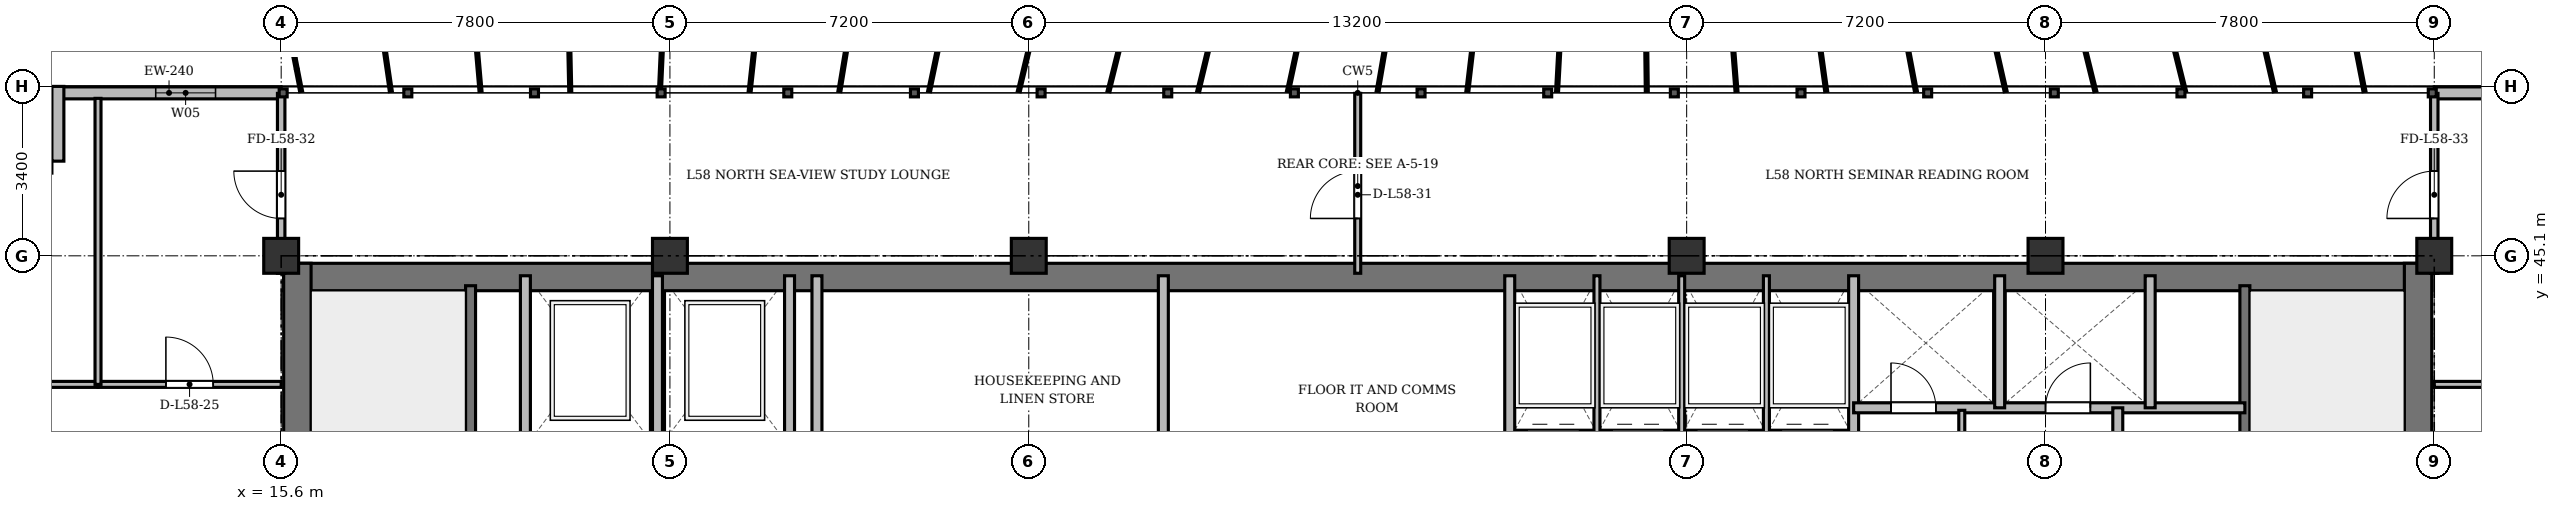
"""IFC4 building model, lengths in metres.
Left out: names, types, materials, properties, quantities, classifications, styles, units other than length and angle.
Written with IfcOpenShell. Run it as: python <this file> out.ifc"""

import sys

from ifc_helpers import new_model, si_unit, direction, frame, frame_2d, origin, origin_2d, place, context, subcontext, project, spatial, rectangle, extrude, source, transform, mapped, element, fill, save


model = new_model("IFC4")
c1 = context("Model", 3, precision=1e-05, world=origin(), true_north=direction((0.0, 1.0)))
c2 = subcontext(c1, "Body", "Model", "MODEL_VIEW")
j1 = project(units=[si_unit("LENGTHUNIT", "METRE"), si_unit("PLANEANGLEUNIT", "RADIAN")], contexts=[c1])
p1 = place(None, origin())
s1 = spatial("IfcSite", under=j1, at=p1, CompositionType="ELEMENT")
p2 = place(p1, origin())
s2 = spatial("IfcBuilding", under=s1, at=p2, CompositionType="ELEMENT")
p3 = place(p2, frame((0.0, 0.0, 222.9)))
s3 = spatial("IfcBuildingStorey", under=s2, at=p3, CompositionType="ELEMENT", Elevation=222.9)
m1 = source(origin(), c2, "Body", "SweptSolid", [
    extrude(rectangle(XDim=0.7, YDim=0.7, at=origin_2d()), origin(), (0.0, 0.0, 1.0), 3.6),
])
for number, where, z_axis, x_axis in (
    (1, (15.6, 45.1, 0.0), (0.0, 0.0, 1.0), (1.0, 0.0, 0.0)),
    (2, (23.4, 45.1, 0.0), (0.0, 0.0, 1.0), (1.0, 0.0, 0.0)),
    (3, (30.6, 45.1, 0.0), (0.0, 0.0, 1.0), (1.0, 0.0, 0.0)),
    (4, (43.8, 45.1, 0.0), (0.0, 0.0, 1.0), (1.0, 0.0, 0.0)),
    (5, (51.0, 45.1, 0.0), (0.0, 0.0, 1.0), (1.0, 0.0, 0.0)),
    (6, (58.8, 45.1, 0.0), (0.0, 0.0, 1.0), (1.0, 0.0, 0.0)),
):
    element("IfcColumn", number, at=place(p3, frame(where, z_axis=z_axis, x_axis=x_axis)), inside=s3, PredefinedType="COLUMN", context=c2, shape_type="MappedRepresentation", body=[
        mapped(m1, transform((0.0, 0.0, 0.0), x_axis=(1.0, 0.0, 0.0), y_axis=(0.0, 1.0, 0.0), z_axis=(0.0, 0.0, 1.0), scale=1.0)),
    ])
p4 = place(p3, frame((11.1, 48.37, 0.0), z_axis=(0.0, 0.0, 1.0), x_axis=(1.0, 0.0, 0.0)))
e7 = element("IfcWall", 7, at=p4, inside=s3, PredefinedType="SOLIDWALL", context=c2, shape_type="SweptSolid", body=[
    extrude(rectangle(XDim=4.5, YDim=0.24, at=frame_2d((2.25, 0.0))), origin(), (0.0, 0.0, 1.0), 3.36),
])
p5 = place(p4, frame((1.983, 0.0, 0.9)))
e8 = element("IfcOpeningElement", 8, at=p5, cuts=e7, PredefinedType="OPENING", context=c2, shape_type="SweptSolid", body=[
    extrude(rectangle(XDim=1.2, YDim=1.65, at=frame_2d((0.6, 0.825))), frame((0.0, 0.13, 0.0), z_axis=(0.0, -1.0, 0.0), x_axis=(1.0, 0.0, 0.0)), (0.0, 0.0, 1.0), 0.26),
])
p6 = place(p3, frame((58.8, 48.37, 0.0), z_axis=(0.0, 0.0, 1.0), x_axis=(1.0, 0.0, 0.0)))
e9 = element("IfcWall", 9, at=p6, inside=s3, PredefinedType="SOLIDWALL", context=c2, shape_type="SweptSolid", body=[
    extrude(rectangle(XDim=4.5, YDim=0.24, at=frame_2d((2.25, 0.0))), origin(), (0.0, 0.0, 1.0), 3.36),
])
p7 = place(p6, frame((1.318, 0.0, 0.9)))
e10 = element("IfcOpeningElement", 10, at=p7, cuts=e9, PredefinedType="OPENING", context=c2, shape_type="SweptSolid", body=[
    extrude(rectangle(XDim=1.2, YDim=1.65, at=frame_2d((0.6, 0.825))), frame((0.0, 0.13, 0.0), z_axis=(0.0, -1.0, 0.0), x_axis=(1.0, 0.0, 0.0)), (0.0, 0.0, 1.0), 0.26),
])
p8 = place(p3, frame((11.12, 47.0, 0.0), z_axis=(0.0, 0.0, 1.0), x_axis=(0.0, 1.0, 0.0)))
e11 = element("IfcWall", 11, at=p8, inside=s3, PredefinedType="SOLIDWALL", context=c2, shape_type="SweptSolid", body=[
    extrude(rectangle(XDim=1.5, YDim=0.24, at=frame_2d((0.75, 0.0))), origin(), (0.0, 0.0, 1.0), 3.36),
])
p9 = place(p3, frame((15.65, 44.675, 0.0), z_axis=(0.0, 0.0, 1.0), x_axis=(1.0, 0.0, 0.0)))
e12 = element("IfcWall", 12, at=p9, inside=s3, PredefinedType="SHEAR", context=c2, shape_type="SweptSolid", body=[
    extrude(rectangle(XDim=43.1, YDim=0.55, at=frame_2d((21.55, 0.0))), origin(), (0.0, 0.0, 1.0), 3.36),
])
for number, where, z_axis, x_axis in (
    (13, (15.925, 33.4, 0.0), (0.0, 0.0, 1.0), (0.0, 1.0, 0.0)),
    (14, (58.475, 33.4, 0.0), (0.0, 0.0, 1.0), (0.0, 1.0, 0.0)),
):
    element("IfcWall", number, at=place(p3, frame(where, z_axis=z_axis, x_axis=x_axis)), inside=s3, PredefinedType="SHEAR", context=c2, shape_type="SweptSolid", body=[
        extrude(rectangle(XDim=11.55, YDim=0.55, at=frame_2d((5.775, 0.0))), origin(), (0.0, 0.0, 1.0), 3.36),
    ])
p10 = place(p3, frame((19.4, 33.4, 0.0), z_axis=(0.0, 0.0, 1.0), x_axis=(0.0, 1.0, 0.0)))
e15 = element("IfcWall", 15, at=p10, inside=s3, PredefinedType="SHEAR", context=c2, shape_type="SweptSolid", body=[
    extrude(rectangle(XDim=11.1, YDim=0.2, at=frame_2d((5.55, 0.0))), origin(), (0.0, 0.0, 1.0), 3.36),
])
p11 = place(p10, frame((0.85, 0.0, 0.0)))
e16 = element("IfcOpeningElement", 16, at=p11, cuts=e15, PredefinedType="OPENING", context=c2, shape_type="SweptSolid", body=[
    extrude(rectangle(XDim=1.1, YDim=2.15, at=frame_2d((0.55, 1.075))), frame((0.0, 0.11, 0.0), z_axis=(0.0, -1.0, 0.0), x_axis=(1.0, 0.0, 0.0)), (0.0, 0.0, 1.0), 0.22),
])
p12 = place(p3, frame((55.0, 33.4, 0.0), z_axis=(0.0, 0.0, 1.0), x_axis=(0.0, 1.0, 0.0)))
e17 = element("IfcWall", 17, at=p12, inside=s3, PredefinedType="SHEAR", context=c2, shape_type="SweptSolid", body=[
    extrude(rectangle(XDim=11.1, YDim=0.2, at=frame_2d((5.55, 0.0))), origin(), (0.0, 0.0, 1.0), 3.36),
])
p13 = place(p12, frame((0.85, 0.0, 0.0)))
e18 = element("IfcOpeningElement", 18, at=p13, cuts=e17, PredefinedType="OPENING", context=c2, shape_type="SweptSolid", body=[
    extrude(rectangle(XDim=1.1, YDim=2.15, at=frame_2d((0.55, 1.075))), frame((0.0, 0.11, 0.0), z_axis=(0.0, -1.0, 0.0), x_axis=(1.0, 0.0, 0.0)), (0.0, 0.0, 1.0), 0.22),
])
for number, where, z_axis, x_axis in (
    (19, (20.5, 41.3, 0.0), (0.0, 0.0, 1.0), (0.0, 1.0, 0.0)),
    (20, (23.15, 41.3, 0.0), (0.0, 0.0, 1.0), (0.0, 1.0, 0.0)),
    (21, (25.8, 41.3, 0.0), (0.0, 0.0, 1.0), (0.0, 1.0, 0.0)),
):
    element("IfcWall", number, at=place(p3, frame(where, z_axis=z_axis, x_axis=x_axis)), inside=s3, PredefinedType="SOLIDWALL", context=c2, shape_type="SweptSolid", body=[
        extrude(rectangle(XDim=3.4, YDim=0.2, at=frame_2d((1.7, 0.0))), origin(), (0.0, 0.0, 1.0), 3.36),
    ])
for number, where, z_axis, x_axis in (
    (22, (26.35, 33.4, 0.0), (0.0, 0.0, 1.0), (0.0, 1.0, 0.0)),
    (23, (33.3, 33.4, 0.0), (0.0, 0.0, 1.0), (0.0, 1.0, 0.0)),
):
    element("IfcWall", number, at=place(p3, frame(where, z_axis=z_axis, x_axis=x_axis)), inside=s3, PredefinedType="SOLIDWALL", context=c2, shape_type="SweptSolid", body=[
        extrude(rectangle(XDim=11.3, YDim=0.2, at=frame_2d((5.65, 0.0))), origin(), (0.0, 0.0, 1.0), 2.91),
    ])
p14 = place(p3, frame((40.25, 41.5, 0.0), z_axis=(0.0, 0.0, 1.0), x_axis=(0.0, 1.0, 0.0)))
e24 = element("IfcWall", 24, at=p14, inside=s3, PredefinedType="SOLIDWALL", context=c2, shape_type="SweptSolid", body=[
    extrude(rectangle(XDim=3.2, YDim=0.2, at=frame_2d((1.6, 0.0))), origin(), (0.0, 0.0, 1.0), 3.36),
])
for number, where, z_axis, x_axis in (
    (25, (42.0, 41.5, 0.0), (0.0, 0.0, 1.0), (0.0, 1.0, 0.0)),
    (26, (43.7, 41.5, 0.0), (0.0, 0.0, 1.0), (0.0, 1.0, 0.0)),
    (27, (45.4, 41.5, 0.0), (0.0, 0.0, 1.0), (0.0, 1.0, 0.0)),
):
    element("IfcWall", number, at=place(p3, frame(where, z_axis=z_axis, x_axis=x_axis)), inside=s3, PredefinedType="PARTITIONING", context=c2, shape_type="SweptSolid", body=[
        extrude(rectangle(XDim=3.2, YDim=0.12, at=frame_2d((1.6, 0.0))), origin(), (0.0, 0.0, 1.0), 3.36),
    ])
p15 = place(p3, frame((47.15, 33.4, 0.0), z_axis=(0.0, 0.0, 1.0), x_axis=(0.0, 1.0, 0.0)))
e28 = element("IfcWall", 28, at=p15, inside=s3, PredefinedType="SOLIDWALL", context=c2, shape_type="SweptSolid", body=[
    extrude(rectangle(XDim=11.3, YDim=0.2, at=frame_2d((5.65, 0.0))), origin(), (0.0, 0.0, 1.0), 2.91),
])
p16 = place(p3, frame((47.15, 42.05, 0.0), z_axis=(0.0, 0.0, 1.0), x_axis=(1.0, 0.0, 0.0)))
e29 = element("IfcWall", 29, at=p16, inside=s3, PredefinedType="SOLIDWALL", context=c2, shape_type="SweptSolid", body=[
    extrude(rectangle(XDim=7.85, YDim=0.2, at=frame_2d((3.925, 0.0))), origin(), (0.0, 0.0, 1.0), 2.86),
])
p17 = place(p16, frame((0.75, 0.0, 0.0)))
e30 = element("IfcOpeningElement", 30, at=p17, cuts=e29, PredefinedType="OPENING", context=c2, shape_type="SweptSolid", body=[
    extrude(rectangle(XDim=0.9, YDim=2.1, at=frame_2d((0.45, 1.05))), frame((0.0, 0.11, 0.0), z_axis=(0.0, -1.0, 0.0), x_axis=(1.0, 0.0, 0.0)), (0.0, 0.0, 1.0), 0.22),
])
p18 = place(p16, frame((3.85, 0.0, 0.0)))
e31 = element("IfcOpeningElement", 31, at=p18, cuts=e29, PredefinedType="OPENING", context=c2, shape_type="SweptSolid", body=[
    extrude(rectangle(XDim=0.9, YDim=2.1, at=frame_2d((0.45, 1.05))), frame((0.0, 0.11, 0.0), z_axis=(0.0, -1.0, 0.0), x_axis=(1.0, 0.0, 0.0)), (0.0, 0.0, 1.0), 0.22),
])
for number, where, z_axis, x_axis in (
    (32, (50.08, 42.05, 0.0), (0.0, 0.0, 1.0), (0.0, 1.0, 0.0)),
    (33, (53.1, 42.05, 0.0), (0.0, 0.0, 1.0), (0.0, 1.0, 0.0)),
):
    element("IfcWall", number, at=place(p3, frame(where, z_axis=z_axis, x_axis=x_axis)), inside=s3, PredefinedType="SOLIDWALL", context=c2, shape_type="SweptSolid", body=[
        extrude(rectangle(XDim=2.65, YDim=0.2, at=frame_2d((1.325, 0.0))), origin(), (0.0, 0.0, 1.0), 3.36),
    ])
p19 = place(p3, frame((52.45, 33.4, 0.0), z_axis=(0.0, 0.0, 1.0), x_axis=(0.0, 1.0, 0.0)))
e34 = element("IfcWall", 34, at=p19, inside=s3, PredefinedType="PARTITIONING", context=c2, shape_type="SweptSolid", body=[
    extrude(rectangle(XDim=8.65, YDim=0.2, at=frame_2d((4.325, 0.0))), origin(), (0.0, 0.0, 1.0), 2.91),
])
p20 = place(p19, frame((6.2, 0.0, 0.0)))
e35 = element("IfcOpeningElement", 35, at=p20, cuts=e34, PredefinedType="OPENING", context=c2, shape_type="SweptSolid", body=[
    extrude(rectangle(XDim=0.95, YDim=2.15, at=frame_2d((0.475, 1.075))), frame((0.0, 0.11, 0.0), z_axis=(0.0, -1.0, 0.0), x_axis=(1.0, 0.0, 0.0)), (0.0, 0.0, 1.0), 0.22),
])
p21 = place(p3, frame((49.32, 33.4, 0.0), z_axis=(0.0, 0.0, 1.0), x_axis=(0.0, 1.0, 0.0)))
e36 = element("IfcWall", 36, at=p21, inside=s3, PredefinedType="PARTITIONING", context=c2, shape_type="SweptSolid", body=[
    extrude(rectangle(XDim=8.6, YDim=0.12, at=frame_2d((4.3, 0.0))), origin(), (0.0, 0.0, 1.0), 2.91),
])
p22 = place(p21, frame((0.85, 0.0, 0.0)))
e37 = element("IfcOpeningElement", 37, at=p22, cuts=e36, PredefinedType="OPENING", context=c2, shape_type="SweptSolid", body=[
    extrude(rectangle(XDim=0.95, YDim=2.15, at=frame_2d((0.475, 1.075))), frame((0.0, 0.07, 0.0), z_axis=(0.0, -1.0, 0.0), x_axis=(1.0, 0.0, 0.0)), (0.0, 0.0, 1.0), 0.14),
])
p23 = place(p21, frame((3.55, 0.0, 0.0)))
e38 = element("IfcOpeningElement", 38, at=p23, cuts=e36, PredefinedType="OPENING", context=c2, shape_type="SweptSolid", body=[
    extrude(rectangle(XDim=0.95, YDim=2.15, at=frame_2d((0.475, 1.075))), frame((0.0, 0.07, 0.0), z_axis=(0.0, -1.0, 0.0), x_axis=(1.0, 0.0, 0.0)), (0.0, 0.0, 1.0), 0.14),
])
p24 = place(p21, frame((6.3, 0.0, 0.0)))
e39 = element("IfcOpeningElement", 39, at=p24, cuts=e36, PredefinedType="OPENING", context=c2, shape_type="SweptSolid", body=[
    extrude(rectangle(XDim=0.95, YDim=2.15, at=frame_2d((0.475, 1.075))), frame((0.0, 0.07, 0.0), z_axis=(0.0, -1.0, 0.0), x_axis=(1.0, 0.0, 0.0)), (0.0, 0.0, 1.0), 0.14),
])
p25 = place(p3, frame((8.25, 42.52, 0.0), z_axis=(0.0, 0.0, 1.0), x_axis=(1.0, 0.0, 0.0)))
e40 = element("IfcWall", 40, at=p25, inside=s3, PredefinedType="PARTITIONING", context=c2, shape_type="SweptSolid", body=[
    extrude(rectangle(XDim=3.675, YDim=0.12, at=frame_2d((1.837, 0.0))), origin(), (0.0, 0.0, 1.0), 2.86),
])
p26 = place(p25, frame((1.363, 0.0, 0.0)))
e41 = element("IfcOpeningElement", 41, at=p26, cuts=e40, PredefinedType="OPENING", context=c2, shape_type="SweptSolid", body=[
    extrude(rectangle(XDim=0.95, YDim=2.15, at=frame_2d((0.475, 1.075))), frame((0.0, 0.07, 0.0), z_axis=(0.0, -1.0, 0.0), x_axis=(1.0, 0.0, 0.0)), (0.0, 0.0, 1.0), 0.14),
])
p27 = place(p3, frame((11.925, 42.52, 0.0), z_axis=(0.0, 0.0, 1.0), x_axis=(1.0, 0.0, 0.0)))
e42 = element("IfcWall", 42, at=p27, inside=s3, PredefinedType="PARTITIONING", context=c2, shape_type="SweptSolid", body=[
    extrude(rectangle(XDim=3.675, YDim=0.12, at=frame_2d((1.837, 0.0))), origin(), (0.0, 0.0, 1.0), 2.86),
])
p28 = place(p27, frame((1.362, 0.0, 0.0)))
e43 = element("IfcOpeningElement", 43, at=p28, cuts=e42, PredefinedType="OPENING", context=c2, shape_type="SweptSolid", body=[
    extrude(rectangle(XDim=0.95, YDim=2.15, at=frame_2d((0.475, 1.075))), frame((0.0, 0.07, 0.0), z_axis=(0.0, -1.0, 0.0), x_axis=(1.0, 0.0, 0.0)), (0.0, 0.0, 1.0), 0.14),
])
p29 = place(p3, frame((11.925, 42.52, 0.0), z_axis=(0.0, 0.0, 1.0), x_axis=(0.0, 1.0, 0.0)))
e44 = element("IfcWall", 44, at=p29, inside=s3, PredefinedType="PARTITIONING", context=c2, shape_type="SweptSolid", body=[
    extrude(rectangle(XDim=5.74, YDim=0.12, at=frame_2d((2.87, 0.0))), origin(), (0.0, 0.0, 1.0), 2.91),
])
p30 = place(p3, frame((58.8, 42.52, 0.0), z_axis=(0.0, 0.0, 1.0), x_axis=(1.0, 0.0, 0.0)))
e45 = element("IfcWall", 45, at=p30, inside=s3, PredefinedType="PARTITIONING", context=c2, shape_type="SweptSolid", body=[
    extrude(rectangle(XDim=3.675, YDim=0.12, at=frame_2d((1.837, 0.0))), origin(), (0.0, 0.0, 1.0), 2.86),
])
p31 = place(p30, frame((1.559, 0.0, 0.0)))
e46 = element("IfcOpeningElement", 46, at=p31, cuts=e45, PredefinedType="OPENING", context=c2, shape_type="SweptSolid", body=[
    extrude(rectangle(XDim=0.95, YDim=2.15, at=frame_2d((0.475, 1.075))), frame((0.0, 0.07, 0.0), z_axis=(0.0, -1.0, 0.0), x_axis=(1.0, 0.0, 0.0)), (0.0, 0.0, 1.0), 0.14),
])
p32 = place(p3, frame((37.2, 44.75, 0.0), z_axis=(0.0, 0.0, 1.0), x_axis=(0.0, 1.0, 0.0)))
e47 = element("IfcWall", 47, at=p32, inside=s3, PredefinedType="PARTITIONING", context=c2, shape_type="SweptSolid", body=[
    extrude(rectangle(XDim=3.61, YDim=0.12, at=frame_2d((1.805, 0.0))), origin(), (0.0, 0.0, 1.0), 2.91),
])
p33 = place(p32, frame((1.1, 0.0, 0.0)))
e48 = element("IfcOpeningElement", 48, at=p33, cuts=e47, PredefinedType="OPENING", context=c2, shape_type="SweptSolid", body=[
    extrude(rectangle(XDim=0.95, YDim=2.15, at=frame_2d((0.475, 1.075))), frame((0.0, 0.07, 0.0), z_axis=(0.0, -1.0, 0.0), x_axis=(1.0, 0.0, 0.0)), (0.0, 0.0, 1.0), 0.14),
])
p34 = place(p3, frame((15.6, 44.75, 0.0), z_axis=(0.0, 0.0, 1.0), x_axis=(0.0, 1.0, 0.0)))
e49 = element("IfcWall", 49, at=p34, inside=s3, PredefinedType="PARTITIONING", context=c2, shape_type="SweptSolid", body=[
    extrude(rectangle(XDim=3.61, YDim=0.15, at=frame_2d((1.805, 0.0))), origin(), (0.0, 0.0, 1.0), 2.86),
])
p35 = place(p34, frame((1.1, 0.0, 0.0)))
e50 = element("IfcOpeningElement", 50, at=p35, cuts=e49, PredefinedType="OPENING", context=c2, shape_type="SweptSolid", body=[
    extrude(rectangle(XDim=0.95, YDim=2.15, at=frame_2d((0.475, 1.075))), frame((0.0, 0.085, 0.0), z_axis=(0.0, -1.0, 0.0), x_axis=(1.0, 0.0, 0.0)), (0.0, 0.0, 1.0), 0.17),
])
p36 = place(p3, frame((58.8, 44.75, 0.0), z_axis=(0.0, 0.0, 1.0), x_axis=(0.0, 1.0, 0.0)))
e51 = element("IfcWall", 51, at=p36, inside=s3, PredefinedType="PARTITIONING", context=c2, shape_type="SweptSolid", body=[
    extrude(rectangle(XDim=3.61, YDim=0.15, at=frame_2d((1.805, 0.0))), origin(), (0.0, 0.0, 1.0), 2.86),
])
p37 = place(p36, frame((1.1, 0.0, 0.0)))
e52 = element("IfcOpeningElement", 52, at=p37, cuts=e51, PredefinedType="OPENING", context=c2, shape_type="SweptSolid", body=[
    extrude(rectangle(XDim=0.95, YDim=2.15, at=frame_2d((0.475, 1.075))), frame((0.0, 0.085, 0.0), z_axis=(0.0, -1.0, 0.0), x_axis=(1.0, 0.0, 0.0)), (0.0, 0.0, 1.0), 0.17),
])
m2 = source(origin(), c2, "Body", "SweptSolid", [
    extrude(rectangle(XDim=1.2, YDim=1.65, at=frame_2d((0.6, 0.825))), frame((0.0, 0.03, 0.0), z_axis=(0.0, -1.0, 0.0), x_axis=(1.0, 0.0, 0.0)), (0.0, 0.0, 1.0), 0.06),
])
p38 = place(p5, origin())
e53 = element("IfcWindow", 53, at=p38, inside=s3, PartitioningType="SINGLE_PANEL", PredefinedType="WINDOW", context=c2, shape_type="MappedRepresentation", body=[
    mapped(m2, transform((0.0, 0.0, 0.0), x_axis=(1.0, 0.0, 0.0), y_axis=(0.0, 1.0, 0.0), z_axis=(0.0, 0.0, 1.0), scale=1.0)),
])
fill(e8, e53)
m3 = source(origin(), c2, "Body", "SweptSolid", [
    extrude(rectangle(XDim=0.9, YDim=2.1, at=frame_2d((0.45, 1.05))), frame((0.0, 0.025, 0.0), z_axis=(0.0, -1.0, 0.0), x_axis=(1.0, 0.0, 0.0)), (0.0, 0.0, 1.0), 0.05),
])
p39 = place(p17, origin())
e54 = element("IfcDoor", 54, at=p39, inside=s3, OperationType="SINGLE_SWING_LEFT", PredefinedType="DOOR", context=c2, shape_type="MappedRepresentation", body=[
    mapped(m3, transform((0.0, 0.0, 0.0), x_axis=(1.0, 0.0, 0.0), y_axis=(0.0, 1.0, 0.0), z_axis=(0.0, 0.0, 1.0), scale=1.0)),
])
fill(e30, e54)
p40 = place(p18, origin())
e55 = element("IfcDoor", 55, at=p40, inside=s3, OperationType="SINGLE_SWING_RIGHT", PredefinedType="DOOR", context=c2, shape_type="MappedRepresentation", body=[
    mapped(m3, transform((0.0, 0.0, 0.0), x_axis=(1.0, 0.0, 0.0), y_axis=(0.0, 1.0, 0.0), z_axis=(0.0, 0.0, 1.0), scale=1.0)),
])
fill(e31, e55)
m4 = source(origin(), c2, "Body", "SweptSolid", [
    extrude(rectangle(XDim=0.95, YDim=2.15, at=frame_2d((0.475, 1.075))), frame((0.0, 0.025, 0.0), z_axis=(0.0, -1.0, 0.0), x_axis=(1.0, 0.0, 0.0)), (0.0, 0.0, 1.0), 0.05),
])
p41 = place(p28, origin())
e56 = element("IfcDoor", 56, at=p41, inside=s3, OperationType="SINGLE_SWING_LEFT", PredefinedType="DOOR", context=c2, shape_type="MappedRepresentation", body=[
    mapped(m4, transform((0.0, 0.0, 0.0), x_axis=(1.0, 0.0, 0.0), y_axis=(0.0, 1.0, 0.0), z_axis=(0.0, 0.0, 1.0), scale=1.0)),
])
fill(e43, e56)
p42 = place(p33, origin())
e57 = element("IfcDoor", 57, at=p42, inside=s3, OperationType="SINGLE_SWING_LEFT", PredefinedType="DOOR", context=c2, shape_type="MappedRepresentation", body=[
    mapped(m4, transform((0.0, 0.0, 0.0), x_axis=(1.0, 0.0, 0.0), y_axis=(0.0, 1.0, 0.0), z_axis=(0.0, 0.0, 1.0), scale=1.0)),
])
fill(e48, e57)
p43 = place(p35, origin())
e58 = element("IfcDoor", 58, at=p43, inside=s3, OperationType="SINGLE_SWING_RIGHT", PredefinedType="DOOR", context=c2, shape_type="MappedRepresentation", body=[
    mapped(m4, transform((0.0, 0.0, 0.0), x_axis=(1.0, 0.0, 0.0), y_axis=(0.0, 1.0, 0.0), z_axis=(0.0, 0.0, 1.0), scale=1.0)),
])
fill(e50, e58)
p44 = place(p37, origin())
e59 = element("IfcDoor", 59, at=p44, inside=s3, OperationType="SINGLE_SWING_LEFT", PredefinedType="DOOR", context=c2, shape_type="MappedRepresentation", body=[
    mapped(m4, transform((0.0, 0.0, 0.0), x_axis=(1.0, 0.0, 0.0), y_axis=(0.0, 1.0, 0.0), z_axis=(0.0, 0.0, 1.0), scale=1.0)),
])
fill(e52, e59)
save(model, sys.argv[1])
